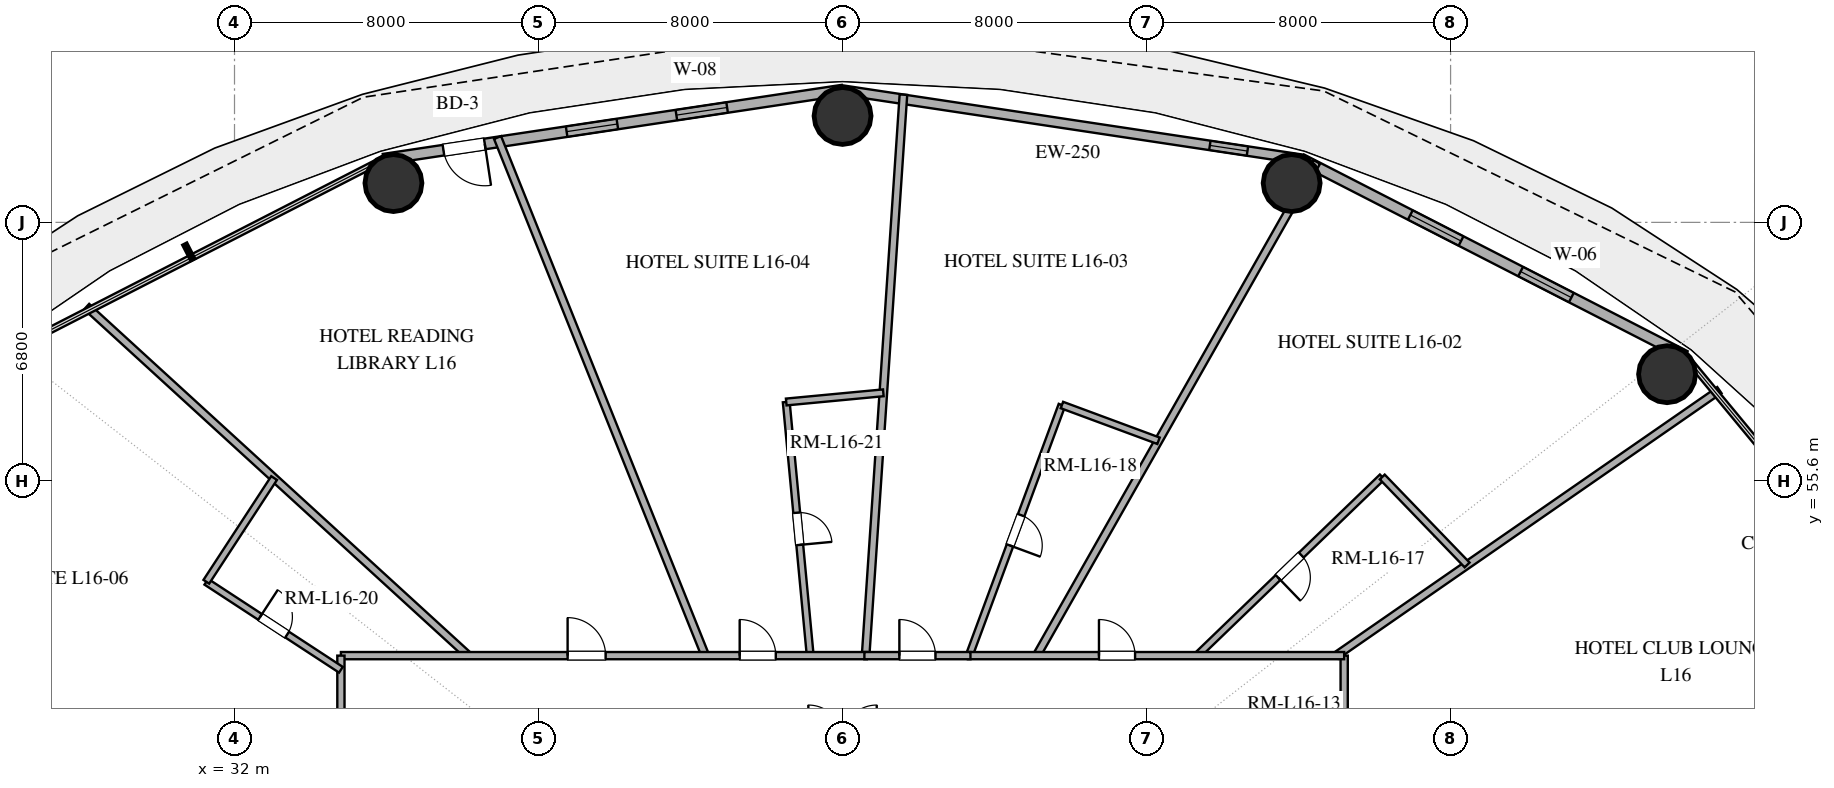
"""IFC4 building model, lengths in metres.
Left out: names, types, materials, properties, quantities, classifications, styles, units other than length and angle.
Written with IfcOpenShell. Run it as: python <this file> out.ifc"""

import sys

from ifc_helpers import new_model, si_unit, direction, frame, frame_2d, origin, origin_2d, place, context, subcontext, project, spatial, rectangle, hollow_circle, extrude, element, fill, save


model = new_model("IFC4")
c1 = context("Model", 3, precision=1e-05, world=origin(), true_north=direction((0.0, 1.0)))
c2 = subcontext(c1, "Body", "Model", "MODEL_VIEW")
j1 = project(units=[si_unit("LENGTHUNIT", "METRE"), si_unit("PLANEANGLEUNIT", "RADIAN")], contexts=[c1])
p1 = place(None, origin())
s1 = spatial("IfcSite", under=j1, at=p1, CompositionType="ELEMENT")
p2 = place(p1, origin())
s2 = spatial("IfcBuilding", under=s1, at=p2, CompositionType="ELEMENT")
p3 = place(p2, frame((0.0, 0.0, 67.8)))
s3 = spatial("IfcBuildingStorey", under=s2, at=p3, CompositionType="ELEMENT", Elevation=67.8)
for number, where, z_axis, x_axis in (
    (1, (69.697, 58.405, 0.0), (0.0, 0.0, 1.0), (1.0, 0.0, 0.0)),
    (2, (59.818, 63.434, 0.0), (0.0, 0.0, 1.0), (1.0, 0.0, 0.0)),
    (3, (48.0, 65.2, 0.0), (0.0, 0.0, 1.0), (1.0, 0.0, 0.0)),
    (4, (36.182, 63.434, 0.0), (0.0, 0.0, 1.0), (1.0, 0.0, 0.0)),
):
    element("IfcColumn", number, at=place(p3, frame(where, z_axis=z_axis, x_axis=x_axis)), inside=s3, PredefinedType="COLUMN", context=c2, shape_type="SweptSolid", body=[
        extrude(hollow_circle(Radius=0.75, WallThickness=0.04, at=origin_2d()), origin(), (0.0, 0.0, 1.0), 3.38),
    ])
p4 = place(p3, frame((70.174, 58.886, 0.0), z_axis=(0.0, 0.0, 1.0), x_axis=(-0.889853976658, 0.456245438581, 0.0)))
e5 = element("IfcWall", 5, at=p4, inside=s3, PredefinedType="SOLIDWALL", context=c2, shape_type="SweptSolid", body=[
    extrude(rectangle(XDim=11.346, YDim=0.28, at=frame_2d((5.673, 0.0))), origin(), (0.0, 0.0, 1.0), 3.38),
])
p5 = place(p4, frame((3.367, 0.0, 0.85)))
e6 = element("IfcOpeningElement", 6, at=p5, cuts=e5, PredefinedType="OPENING", context=c2, shape_type="SweptSolid", body=[
    extrude(rectangle(XDim=1.5, YDim=2.0, at=frame_2d((0.75, 1.0))), frame((0.0, 0.15, 0.0), z_axis=(0.0, -1.0, 0.0), x_axis=(1.0, 0.0, 0.0)), (0.0, 0.0, 1.0), 0.3),
])
p6 = place(p4, frame((6.629, 0.0, 0.85)))
e7 = element("IfcOpeningElement", 7, at=p6, cuts=e5, PredefinedType="OPENING", context=c2, shape_type="SweptSolid", body=[
    extrude(rectangle(XDim=1.5, YDim=2.0, at=frame_2d((0.75, 1.0))), frame((0.0, 0.15, 0.0), z_axis=(0.0, -1.0, 0.0), x_axis=(1.0, 0.0, 0.0)), (0.0, 0.0, 1.0), 0.3),
])
p7 = place(p3, frame((60.078, 64.062, 0.0), z_axis=(0.0, 0.0, 1.0), x_axis=(-0.988864835849, 0.148816452121, 0.0)))
e8 = element("IfcWall", 8, at=p7, inside=s3, PredefinedType="SOLIDWALL", context=c2, shape_type="SweptSolid", body=[
    extrude(rectangle(XDim=12.214, YDim=0.25, at=frame_2d((6.107, 0.0))), origin(), (0.0, 0.0, 1.0), 3.38),
])
p8 = place(p7, frame((1.439, 0.0, 1.42)))
e9 = element("IfcOpeningElement", 9, at=p8, cuts=e8, PredefinedType="OPENING", context=c2, shape_type="SweptSolid", body=[
    extrude(rectangle(XDim=1.0, YDim=1.05, at=frame_2d((0.5, 0.525))), frame((0.0, 0.135, 0.0), z_axis=(0.0, -1.0, 0.0), x_axis=(1.0, 0.0, 0.0)), (0.0, 0.0, 1.0), 0.27),
])
p9 = place(p3, frame((48.0, 65.88, 0.0), z_axis=(0.0, 0.0, 1.0), x_axis=(-0.988864835849, -0.148816452121, 0.0)))
e10 = element("IfcWall", 10, at=p9, inside=s3, PredefinedType="SOLIDWALL", context=c2, shape_type="SweptSolid", body=[
    extrude(rectangle(XDim=12.214, YDim=0.28, at=frame_2d((6.107, 0.0))), origin(), (0.0, 0.0, 1.0), 3.38),
])
p10 = place(p9, frame((3.072, 0.0, 0.85)))
e11 = element("IfcOpeningElement", 11, at=p10, cuts=e10, PredefinedType="OPENING", context=c2, shape_type="SweptSolid", body=[
    extrude(rectangle(XDim=1.35, YDim=1.8, at=frame_2d((0.675, 0.9))), frame((0.0, 0.15, 0.0), z_axis=(0.0, -1.0, 0.0), x_axis=(1.0, 0.0, 0.0)), (0.0, 0.0, 1.0), 0.3),
])
p11 = place(p9, frame((5.992, 0.0, 0.85)))
e12 = element("IfcOpeningElement", 12, at=p11, cuts=e10, PredefinedType="OPENING", context=c2, shape_type="SweptSolid", body=[
    extrude(rectangle(XDim=1.35, YDim=1.8, at=frame_2d((0.675, 0.9))), frame((0.0, 0.15, 0.0), z_axis=(0.0, -1.0, 0.0), x_axis=(1.0, 0.0, 0.0)), (0.0, 0.0, 1.0), 0.3),
])
p12 = place(p9, frame((9.52, 0.0, 0.0)))
e13 = element("IfcOpeningElement", 13, at=p12, cuts=e10, PredefinedType="OPENING", context=c2, shape_type="SweptSolid", body=[
    extrude(rectangle(XDim=1.1, YDim=2.25, at=frame_2d((0.55, 1.125))), frame((0.0, 0.15, 0.0), z_axis=(0.0, -1.0, 0.0), x_axis=(1.0, 0.0, 0.0)), (0.0, 0.0, 1.0), 0.3),
])
p13 = place(p3, frame((44.39, 51.0, 0.0), z_axis=(0.0, 0.0, 1.0), x_axis=(-0.372301847193, 0.928111703717, 0.0)))
e14 = element("IfcWall", 14, at=p13, inside=s3, PredefinedType="PARTITIONING", context=c2, shape_type="SweptSolid", body=[
    extrude(rectangle(XDim=14.688, YDim=0.2, at=frame_2d((7.344, 0.0))), origin(), (0.0, 0.0, 1.0), 2.74),
])
p14 = place(p3, frame((19.184, 50.653, 0.0), z_axis=(0.0, 0.0, 1.0), x_axis=(0.957749889613, -0.287602414708, 0.0)))
e15 = element("IfcWall", 15, at=p14, inside=s3, PredefinedType="PARTITIONING", context=c2, shape_type="SweptSolid", body=[
    extrude(rectangle(XDim=8.8, YDim=0.2, at=frame_2d((4.4, 0.0))), origin(), (0.0, 0.0, 1.0), 2.74),
])
p15 = place(p3, frame((53.107, 51.0, 0.0), z_axis=(0.0, 0.0, 1.0), x_axis=(0.493512300658, 0.869738816599, 0.0)))
e16 = element("IfcWall", 16, at=p15, inside=s3, PredefinedType="PARTITIONING", context=c2, shape_type="SweptSolid", body=[
    extrude(rectangle(XDim=14.938, YDim=0.2, at=frame_2d((7.469, 0.0))), origin(), (0.0, 0.0, 1.0), 2.74),
])
p16 = place(p3, frame((60.991, 51.0, 0.0), z_axis=(0.0, 0.0, 1.0), x_axis=(0.821999402566, 0.569488351226, 0.0)))
e17 = element("IfcWall", 17, at=p16, inside=s3, PredefinedType="PARTITIONING", context=c2, shape_type="SweptSolid", body=[
    extrude(rectangle(XDim=12.266, YDim=0.2, at=frame_2d((6.133, 0.0))), origin(), (0.0, 0.0, 1.0), 2.74),
])
p17 = place(p3, frame((48.607, 51.0, 0.0), z_axis=(0.0, 0.0, 1.0), x_axis=(0.067284649742, 0.997733820169, 0.0)))
e18 = element("IfcWall", 18, at=p17, inside=s3, PredefinedType="PARTITIONING", context=c2, shape_type="SweptSolid", body=[
    extrude(rectangle(XDim=14.793, YDim=0.2, at=frame_2d((7.396, 0.0))), origin(), (0.0, 0.0, 1.0), 2.74),
])
p18 = place(p3, frame((53.773, 57.594, 0.0), z_axis=(0.0, 0.0, 1.0), x_axis=(-0.347170736851, -0.93780194043, 0.0)))
e19 = element("IfcWall", 19, at=p18, inside=s3, PredefinedType="PLUMBINGWALL", context=c2, shape_type="SweptSolid", body=[
    extrude(rectangle(XDim=7.031, YDim=0.18, at=frame_2d((3.516, 0.0))), origin(), (0.0, 0.0, 1.0), 2.74),
])
p19 = place(p18, frame((3.091, 0.0, 0.0)))
e20 = element("IfcOpeningElement", 20, at=p19, cuts=e19, PredefinedType="OPENING", context=c2, shape_type="SweptSolid", body=[
    extrude(rectangle(XDim=0.85, YDim=2.1, at=frame_2d((0.425, 1.05))), frame((0.0, 0.1, 0.0), z_axis=(0.0, -1.0, 0.0), x_axis=(1.0, 0.0, 0.0)), (0.0, 0.0, 1.0), 0.2),
])
p20 = place(p3, frame((38.154, 51.0, 0.0), z_axis=(0.0, 0.0, 1.0), x_axis=(-0.738119160364, 0.674670367738, 0.0)))
e21 = element("IfcWall", 21, at=p20, inside=s3, PredefinedType="PARTITIONING", context=c2, shape_type="SweptSolid", body=[
    extrude(rectangle(XDim=13.61, YDim=0.2, at=frame_2d((6.805, 0.0))), origin(), (0.0, 0.0, 1.0), 2.74),
])
p21 = place(p3, frame((61.2, 51.0, 0.0), z_axis=(0.0, 0.0, 1.0), x_axis=(0.0, -1.0, 0.0)))
e22 = element("IfcWall", 22, at=p21, inside=s3, PredefinedType="PARTITIONING", context=c2, shape_type="SweptSolid", body=[
    extrude(rectangle(XDim=12.964, YDim=0.19, at=frame_2d((6.482, 0.0))), origin(), (0.0, 0.0, 1.0), 2.74),
])
p22 = place(p21, frame((2.971, 0.0, 0.0)))
e23 = element("IfcOpeningElement", 23, at=p22, cuts=e22, PredefinedType="OPENING", context=c2, shape_type="SweptSolid", body=[
    extrude(rectangle(XDim=1.0, YDim=2.2, at=frame_2d((0.5, 1.1))), frame((0.0, 0.105, 0.0), z_axis=(0.0, -1.0, 0.0), x_axis=(1.0, 0.0, 0.0)), (0.0, 0.0, 1.0), 0.21),
])
p23 = place(p21, frame((8.344, 0.0, 0.0)))
e24 = element("IfcOpeningElement", 24, at=p23, cuts=e22, PredefinedType="OPENING", context=c2, shape_type="SweptSolid", body=[
    extrude(rectangle(XDim=0.95, YDim=2.15, at=frame_2d((0.475, 1.075))), frame((0.0, 0.105, 0.0), z_axis=(0.0, -1.0, 0.0), x_axis=(1.0, 0.0, 0.0)), (0.0, 0.0, 1.0), 0.21),
])
p24 = place(p3, frame((62.202, 55.701, 0.0), z_axis=(0.0, 0.0, 1.0), x_axis=(-0.719667322044, -0.69431905172, 0.0)))
e25 = element("IfcWall", 25, at=p24, inside=s3, PredefinedType="PLUMBINGWALL", context=c2, shape_type="SweptSolid", body=[
    extrude(rectangle(XDim=6.771, YDim=0.18, at=frame_2d((3.385, 0.0))), origin(), (0.0, 0.0, 1.0), 2.74),
])
p25 = place(p24, frame((2.96, 0.0, 0.0)))
e26 = element("IfcOpeningElement", 26, at=p25, cuts=e25, PredefinedType="OPENING", context=c2, shape_type="SweptSolid", body=[
    extrude(rectangle(XDim=0.85, YDim=2.1, at=frame_2d((0.425, 1.05))), frame((0.0, 0.1, 0.0), z_axis=(0.0, -1.0, 0.0), x_axis=(1.0, 0.0, 0.0)), (0.0, 0.0, 1.0), 0.2),
])
p26 = place(p3, frame((46.518, 57.674, 0.0), z_axis=(0.0, 0.0, 1.0), x_axis=(0.094107851527, -0.995562008255, 0.0)))
e27 = element("IfcWall", 27, at=p26, inside=s3, PredefinedType="PLUMBINGWALL", context=c2, shape_type="SweptSolid", body=[
    extrude(rectangle(XDim=6.704, YDim=0.18, at=frame_2d((3.352, 0.0))), origin(), (0.0, 0.0, 1.0), 2.74),
])
p27 = place(p26, frame((2.927, 0.0, 0.0)))
e28 = element("IfcOpeningElement", 28, at=p27, cuts=e27, PredefinedType="OPENING", context=c2, shape_type="SweptSolid", body=[
    extrude(rectangle(XDim=0.85, YDim=2.1, at=frame_2d((0.425, 1.05))), frame((0.0, 0.1, 0.0), z_axis=(0.0, -1.0, 0.0), x_axis=(1.0, 0.0, 0.0)), (0.0, 0.0, 1.0), 0.2),
])
p28 = place(p3, frame((34.8, 51.0, 0.0), z_axis=(0.0, 0.0, 1.0), x_axis=(1.0, 0.0, 0.0)))
e29 = element("IfcWall", 29, at=p28, inside=s3, PredefinedType="PARTITIONING", context=c2, shape_type="SweptSolid", body=[
    extrude(rectangle(XDim=13.839, YDim=0.19, at=frame_2d((6.919, 0.0))), origin(), (0.0, 0.0, 1.0), 2.74),
])
p29 = place(p28, frame((5.965, 0.0, 0.0)))
e30 = element("IfcOpeningElement", 30, at=p29, cuts=e29, PredefinedType="OPENING", context=c2, shape_type="SweptSolid", body=[
    extrude(rectangle(XDim=1.0, YDim=2.2, at=frame_2d((0.5, 1.1))), frame((0.0, 0.105, 0.0), z_axis=(0.0, -1.0, 0.0), x_axis=(1.0, 0.0, 0.0)), (0.0, 0.0, 1.0), 0.21),
])
p30 = place(p28, frame((10.493, 0.0, 0.0)))
e31 = element("IfcOpeningElement", 31, at=p30, cuts=e29, PredefinedType="OPENING", context=c2, shape_type="SweptSolid", body=[
    extrude(rectangle(XDim=0.95, YDim=2.15, at=frame_2d((0.475, 1.075))), frame((0.0, 0.105, 0.0), z_axis=(0.0, -1.0, 0.0), x_axis=(1.0, 0.0, 0.0)), (0.0, 0.0, 1.0), 0.21),
])
p31 = place(p3, frame((34.8, 43.728, 0.0), z_axis=(0.0, 0.0, 1.0), x_axis=(0.0, 1.0, 0.0)))
e32 = element("IfcWall", 32, at=p31, inside=s3, PredefinedType="PARTITIONING", context=c2, shape_type="SweptSolid", body=[
    extrude(rectangle(XDim=7.272, YDim=0.19, at=frame_2d((3.636, 0.0))), origin(), (0.0, 0.0, 1.0), 2.74),
])
p32 = place(p31, frame((4.096, 0.0, 0.0)))
e33 = element("IfcOpeningElement", 33, at=p32, cuts=e32, PredefinedType="OPENING", context=c2, shape_type="SweptSolid", body=[
    extrude(rectangle(XDim=0.95, YDim=2.15, at=frame_2d((0.475, 1.075))), frame((0.0, 0.105, 0.0), z_axis=(0.0, -1.0, 0.0), x_axis=(1.0, 0.0, 0.0)), (0.0, 0.0, 1.0), 0.21),
])
p33 = place(p3, frame((51.298, 51.0, 0.0), z_axis=(0.0, 0.0, 1.0), x_axis=(1.0, 0.0, 0.0)))
e34 = element("IfcWall", 34, at=p33, inside=s3, PredefinedType="PARTITIONING", context=c2, shape_type="SweptSolid", body=[
    extrude(rectangle(XDim=9.902, YDim=0.19, at=frame_2d((4.951, 0.0))), origin(), (0.0, 0.0, 1.0), 2.74),
])
p34 = place(p33, frame((3.45, 0.0, 0.0)))
e35 = element("IfcOpeningElement", 35, at=p34, cuts=e34, PredefinedType="OPENING", context=c2, shape_type="SweptSolid", body=[
    extrude(rectangle(XDim=0.95, YDim=2.15, at=frame_2d((0.475, 1.075))), frame((0.0, 0.105, 0.0), z_axis=(0.0, -1.0, 0.0), x_axis=(1.0, 0.0, 0.0)), (0.0, 0.0, 1.0), 0.21),
])
p35 = place(p3, frame((31.258, 52.944, 0.0), z_axis=(0.0, 0.0, 1.0), x_axis=(0.837031612028, -0.5471545307, 0.0)))
e36 = element("IfcWall", 36, at=p35, inside=s3, PredefinedType="PLUMBINGWALL", context=c2, shape_type="SweptSolid", body=[
    extrude(rectangle(XDim=4.231, YDim=0.18, at=frame_2d((2.116, 0.0))), origin(), (0.0, 0.0, 1.0), 2.74),
])
p36 = place(p35, frame((1.691, 0.0, 0.0)))
e37 = element("IfcOpeningElement", 37, at=p36, cuts=e36, PredefinedType="OPENING", context=c2, shape_type="SweptSolid", body=[
    extrude(rectangle(XDim=0.85, YDim=2.1, at=frame_2d((0.425, 1.05))), frame((0.0, 0.1, 0.0), z_axis=(0.0, -1.0, 0.0), x_axis=(1.0, 0.0, 0.0)), (0.0, 0.0, 1.0), 0.2),
])
p37 = place(p3, frame((33.042, 55.672, 0.0), z_axis=(0.0, 0.0, 1.0), x_axis=(-0.547176717469, -0.837017108463, 0.0)))
e38 = element("IfcWall", 38, at=p37, inside=s3, PredefinedType="PLUMBINGWALL", context=c2, shape_type="SweptSolid", body=[
    extrude(rectangle(XDim=3.26, YDim=0.18, at=frame_2d((1.63, 0.0))), origin(), (0.0, 0.0, 1.0), 2.74),
])
p38 = place(p3, frame((64.435, 53.386, 0.0), z_axis=(0.0, 0.0, 1.0), x_axis=(-0.694278833189, 0.719706121821, 0.0)))
e39 = element("IfcWall", 39, at=p38, inside=s3, PredefinedType="PLUMBINGWALL", context=c2, shape_type="SweptSolid", body=[
    extrude(rectangle(XDim=3.217, YDim=0.18, at=frame_2d((1.608, 0.0))), origin(), (0.0, 0.0, 1.0), 2.74),
])
p39 = place(p3, frame((48.575, 51.0, 0.0), z_axis=(0.0, 0.0, 1.0), x_axis=(1.0, 0.0, 0.0)))
e40 = element("IfcWall", 40, at=p39, inside=s3, PredefinedType="PARTITIONING", context=c2, shape_type="SweptSolid", body=[
    extrude(rectangle(XDim=2.791, YDim=0.19, at=frame_2d((1.396, 0.0))), origin(), (0.0, 0.0, 1.0), 2.74),
])
p40 = place(p39, frame((0.921, 0.0, 0.0)))
e41 = element("IfcOpeningElement", 41, at=p40, cuts=e40, PredefinedType="OPENING", context=c2, shape_type="SweptSolid", body=[
    extrude(rectangle(XDim=0.95, YDim=2.15, at=frame_2d((0.475, 1.075))), frame((0.0, 0.105, 0.0), z_axis=(0.0, -1.0, 0.0), x_axis=(1.0, 0.0, 0.0)), (0.0, 0.0, 1.0), 0.21),
])
p41 = place(p3, frame((56.315, 56.653, 0.0), z_axis=(0.0, 0.0, 1.0), x_axis=(-0.937805250992, 0.347161793999, 0.0)))
e42 = element("IfcWall", 42, at=p41, inside=s3, PredefinedType="PLUMBINGWALL", context=c2, shape_type="SweptSolid", body=[
    extrude(rectangle(XDim=2.71, YDim=0.18, at=frame_2d((1.355, 0.0))), origin(), (0.0, 0.0, 1.0), 2.74),
])
p42 = place(p3, frame((49.073, 57.915, 0.0), z_axis=(0.0, 0.0, 1.0), x_axis=(-0.995563205557, -0.09409518447, 0.0)))
e43 = element("IfcWall", 43, at=p42, inside=s3, PredefinedType="PLUMBINGWALL", context=c2, shape_type="SweptSolid", body=[
    extrude(rectangle(XDim=2.566, YDim=0.18, at=frame_2d((1.283, 0.0))), origin(), (0.0, 0.0, 1.0), 2.74),
])
p43 = place(p5, origin())
e44 = element("IfcWindow", 44, at=p43, inside=s3, PartitioningType="SINGLE_PANEL", PredefinedType="WINDOW", context=c2, shape_type="SweptSolid", body=[
    extrude(rectangle(XDim=1.5, YDim=2.0, at=frame_2d((0.75, 1.0))), frame((0.0, 0.03, 0.0), z_axis=(0.0, -1.0, 0.0), x_axis=(1.0, 0.0, 0.0)), (0.0, 0.0, 1.0), 0.06),
])
fill(e6, e44)
p44 = place(p6, origin())
e45 = element("IfcWindow", 45, at=p44, inside=s3, PartitioningType="SINGLE_PANEL", PredefinedType="WINDOW", context=c2, shape_type="SweptSolid", body=[
    extrude(rectangle(XDim=1.5, YDim=2.0, at=frame_2d((0.75, 1.0))), frame((0.0, 0.03, 0.0), z_axis=(0.0, -1.0, 0.0), x_axis=(1.0, 0.0, 0.0)), (0.0, 0.0, 1.0), 0.06),
])
fill(e7, e45)
p45 = place(p10, origin())
e46 = element("IfcWindow", 46, at=p45, inside=s3, PartitioningType="SINGLE_PANEL", PredefinedType="WINDOW", context=c2, shape_type="SweptSolid", body=[
    extrude(rectangle(XDim=1.35, YDim=1.8, at=frame_2d((0.675, 0.9))), frame((0.0, 0.03, 0.0), z_axis=(0.0, -1.0, 0.0), x_axis=(1.0, 0.0, 0.0)), (0.0, 0.0, 1.0), 0.06),
])
fill(e11, e46)
p46 = place(p11, origin())
e47 = element("IfcWindow", 47, at=p46, inside=s3, PartitioningType="SINGLE_PANEL", PredefinedType="WINDOW", context=c2, shape_type="SweptSolid", body=[
    extrude(rectangle(XDim=1.35, YDim=1.8, at=frame_2d((0.675, 0.9))), frame((0.0, 0.03, 0.0), z_axis=(0.0, -1.0, 0.0), x_axis=(1.0, 0.0, 0.0)), (0.0, 0.0, 1.0), 0.06),
])
fill(e12, e47)
p47 = place(p12, origin())
e48 = element("IfcDoor", 48, at=p47, inside=s3, OperationType="SINGLE_SWING_LEFT", PredefinedType="DOOR", context=c2, shape_type="SweptSolid", body=[
    extrude(rectangle(XDim=1.1, YDim=2.25, at=frame_2d((0.55, 1.125))), frame((0.0, 0.025, 0.0), z_axis=(0.0, -1.0, 0.0), x_axis=(1.0, 0.0, 0.0)), (0.0, 0.0, 1.0), 0.05),
])
fill(e13, e48)
p48 = place(p8, origin())
e49 = element("IfcWindow", 49, at=p48, inside=s3, PartitioningType="SINGLE_PANEL", PredefinedType="WINDOW", context=c2, shape_type="SweptSolid", body=[
    extrude(rectangle(XDim=1.0, YDim=1.05, at=frame_2d((0.5, 0.525))), frame((0.0, 0.03, 0.0), z_axis=(0.0, -1.0, 0.0), x_axis=(1.0, 0.0, 0.0)), (0.0, 0.0, 1.0), 0.06),
])
fill(e9, e49)
p49 = place(p19, origin())
e50 = element("IfcDoor", 50, at=p49, inside=s3, OperationType="SINGLE_SWING_RIGHT", PredefinedType="DOOR", context=c2, shape_type="SweptSolid", body=[
    extrude(rectangle(XDim=0.85, YDim=2.1, at=frame_2d((0.425, 1.05))), frame((0.0, 0.025, 0.0), z_axis=(0.0, -1.0, 0.0), x_axis=(1.0, 0.0, 0.0)), (0.0, 0.0, 1.0), 0.05),
])
fill(e20, e50)
p50 = place(p25, origin())
e51 = element("IfcDoor", 51, at=p50, inside=s3, OperationType="SINGLE_SWING_RIGHT", PredefinedType="DOOR", context=c2, shape_type="SweptSolid", body=[
    extrude(rectangle(XDim=0.85, YDim=2.1, at=frame_2d((0.425, 1.05))), frame((0.0, 0.025, 0.0), z_axis=(0.0, -1.0, 0.0), x_axis=(1.0, 0.0, 0.0)), (0.0, 0.0, 1.0), 0.05),
])
fill(e26, e51)
p51 = place(p27, origin())
e52 = element("IfcDoor", 52, at=p51, inside=s3, OperationType="SINGLE_SWING_RIGHT", PredefinedType="DOOR", context=c2, shape_type="SweptSolid", body=[
    extrude(rectangle(XDim=0.85, YDim=2.1, at=frame_2d((0.425, 1.05))), frame((0.0, 0.025, 0.0), z_axis=(0.0, -1.0, 0.0), x_axis=(1.0, 0.0, 0.0)), (0.0, 0.0, 1.0), 0.05),
])
fill(e28, e52)
p52 = place(p29, origin())
e53 = element("IfcDoor", 53, at=p52, inside=s3, OperationType="SINGLE_SWING_LEFT", PredefinedType="DOOR", context=c2, shape_type="SweptSolid", body=[
    extrude(rectangle(XDim=1.0, YDim=2.2, at=frame_2d((0.5, 1.1))), frame((0.0, 0.025, 0.0), z_axis=(0.0, -1.0, 0.0), x_axis=(1.0, 0.0, 0.0)), (0.0, 0.0, 1.0), 0.05),
])
fill(e30, e53)
p53 = place(p30, origin())
e54 = element("IfcDoor", 54, at=p53, inside=s3, OperationType="SINGLE_SWING_LEFT", PredefinedType="DOOR", context=c2, shape_type="SweptSolid", body=[
    extrude(rectangle(XDim=0.95, YDim=2.15, at=frame_2d((0.475, 1.075))), frame((0.0, 0.025, 0.0), z_axis=(0.0, -1.0, 0.0), x_axis=(1.0, 0.0, 0.0)), (0.0, 0.0, 1.0), 0.05),
])
fill(e31, e54)
p54 = place(p34, origin())
e55 = element("IfcDoor", 55, at=p54, inside=s3, OperationType="SINGLE_SWING_LEFT", PredefinedType="DOOR", context=c2, shape_type="SweptSolid", body=[
    extrude(rectangle(XDim=0.95, YDim=2.15, at=frame_2d((0.475, 1.075))), frame((0.0, 0.025, 0.0), z_axis=(0.0, -1.0, 0.0), x_axis=(1.0, 0.0, 0.0)), (0.0, 0.0, 1.0), 0.05),
])
fill(e35, e55)
p55 = place(p36, origin())
e56 = element("IfcDoor", 56, at=p55, inside=s3, OperationType="SINGLE_SWING_LEFT", PredefinedType="DOOR", context=c2, shape_type="SweptSolid", body=[
    extrude(rectangle(XDim=0.85, YDim=2.1, at=frame_2d((0.425, 1.05))), frame((0.0, 0.025, 0.0), z_axis=(0.0, -1.0, 0.0), x_axis=(1.0, 0.0, 0.0)), (0.0, 0.0, 1.0), 0.05),
])
fill(e37, e56)
p56 = place(p40, origin())
e57 = element("IfcDoor", 57, at=p56, inside=s3, OperationType="SINGLE_SWING_LEFT", PredefinedType="DOOR", context=c2, shape_type="SweptSolid", body=[
    extrude(rectangle(XDim=0.95, YDim=2.15, at=frame_2d((0.475, 1.075))), frame((0.0, 0.025, 0.0), z_axis=(0.0, -1.0, 0.0), x_axis=(1.0, 0.0, 0.0)), (0.0, 0.0, 1.0), 0.05),
])
fill(e41, e57)
save(model, sys.argv[1])
